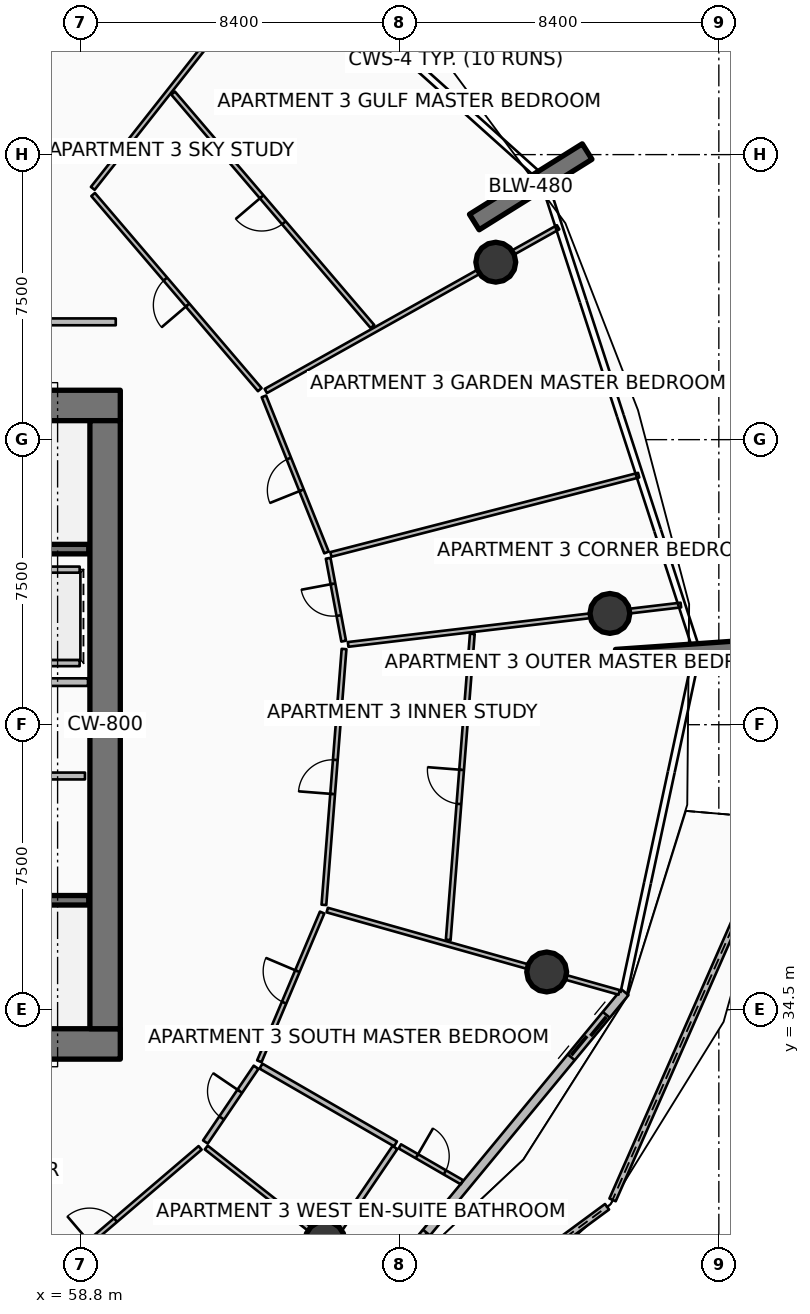
"""IFC4 building model, lengths in metres.
Left out: names, types, materials, properties, quantities, classifications, styles, units other than length and angle.
Written with IfcOpenShell. Run it as: python <this file> out.ifc"""

import sys

from ifc_helpers import new_model, si_unit, direction, frame, frame_2d, origin, origin_2d, place, context, subcontext, project, spatial, polyline, rectangle, circle, outline, extrude, element, fill, save


model = new_model("IFC4")
c1 = context("Model", 3, precision=1e-05, world=origin(), true_north=direction((0.0, 1.0)))
c2 = subcontext(c1, "Body", "Model", "MODEL_VIEW")
j1 = project(units=[si_unit("LENGTHUNIT", "METRE"), si_unit("PLANEANGLEUNIT", "RADIAN")], contexts=[c1])
p1 = place(None, origin())
s1 = spatial("IfcSite", under=j1, at=p1, CompositionType="ELEMENT")
p2 = place(p1, origin())
s2 = spatial("IfcBuilding", under=s1, at=p2, CompositionType="ELEMENT")
p3 = place(p2, frame((0.0, 0.0, 154.05)))
s3 = spatial("IfcBuildingStorey", under=s2, at=p3, CompositionType="ELEMENT", Elevation=154.05)
for number, where, z_axis, x_axis in (
    (1, (49.95, 33.6, 0.0), (0.0, 0.0, 1.0), (1.0, 0.0, 0.0)),
    (2, (49.95, 50.4, 0.0), (0.0, 0.0, 1.0), (1.0, 0.0, 0.0)),
):
    element("IfcWall", number, at=place(p3, frame(where, z_axis=z_axis, x_axis=x_axis)), inside=s3, PredefinedType="SHEAR", context=c2, shape_type="SweptSolid", body=[
        extrude(rectangle(XDim=9.9, YDim=0.8, at=frame_2d((4.95, 0.0))), origin(), (0.0, 0.0, 1.0), 3.75),
    ])
p4 = place(p3, frame((59.45, 34.0, 0.0), z_axis=(0.0, 0.0, 1.0), x_axis=(0.0, 1.0, 0.0)))
e3 = element("IfcWall", 3, at=p4, inside=s3, PredefinedType="SHEAR", context=c2, shape_type="SweptSolid", body=[
    extrude(rectangle(XDim=16.0, YDim=0.8, at=frame_2d((8.0, 0.0))), origin(), (0.0, 0.0, 1.0), 3.75),
])
for number, where, z_axis, x_axis in (
    (4, (69.165, 55.226, 0.0), (0.0, 0.0, 1.0), (0.848, 0.53, 0.0)),
    (5, (72.897, 43.741, 0.0), (0.0, 0.0, 1.0), (0.998, 0.07, 0.0)),
):
    element("IfcWall", number, at=place(p3, frame(where, z_axis=z_axis, x_axis=x_axis)), inside=s3, PredefinedType="SOLIDWALL", context=c2, shape_type="SweptSolid", body=[
        extrude(rectangle(XDim=3.5, YDim=0.48, at=frame_2d((1.75, 0.0))), origin(), (0.0, 0.0, 1.0), 3.75),
    ])
for number, where, z_axis, x_axis in (
    (6, (69.73, 54.169, 0.0), (0.0, 0.0, 1.0), (1.0, 0.0, 0.0)),
    (7, (65.234, 28.414, 0.0), (0.0, 0.0, 1.0), (1.0, 0.0, 0.0)),
    (8, (71.07, 35.494, 0.0), (0.0, 0.0, 1.0), (1.0, 0.0, 0.0)),
    (9, (72.733, 44.927, 0.0), (0.0, 0.0, 1.0), (1.0, 0.0, 0.0)),
):
    element("IfcColumn", number, at=place(p3, frame(where, z_axis=z_axis, x_axis=x_axis)), inside=s3, PredefinedType="COLUMN", context=c2, shape_type="SweptSolid", body=[
        extrude(circle(Radius=0.525, at=origin_2d()), origin(), (0.0, 0.0, 1.0), 3.5),
    ])
p5 = place(p3, frame((64.3, 23.15, 0.0), z_axis=(0.0, 0.0, 1.0), x_axis=(0.804716582715, 0.593659179584, 0.0)))
e10 = element("IfcWall", 10, at=p5, inside=s3, PredefinedType="PARAPET", context=c2, shape_type="SweptSolid", body=[
    extrude(outline(polyline([(0.0, 0.0), (10.386, 0.0), (10.386, 1.832), (5.193, 1.696), (0.0, 1.497), (0.0, 0.0)])), frame((0.0, 0.09, 0.0), z_axis=(0.0, -1.0, 0.0), x_axis=(1.0, 0.0, 0.0)), (0.0, 0.0, 1.0), 0.18),
])
p6 = place(p3, frame((72.803, 29.497, 0.0), z_axis=(0.0, 0.0, 1.0), x_axis=(0.402973896797, 0.915211472011, 0.0)))
e11 = element("IfcWall", 11, at=p6, inside=s3, PredefinedType="PARAPET", context=c2, shape_type="SweptSolid", body=[
    extrude(outline(polyline([(0.0, 0.0), (10.953, 0.0), (10.953, 1.756), (5.477, 1.853), (0.0, 1.832), (0.0, 0.0)])), frame((0.0, 0.09, 0.0), z_axis=(0.0, -1.0, 0.0), x_axis=(1.0, 0.0, 0.0)), (0.0, 0.0, 1.0), 0.18),
])
p7 = place(p3, frame((66.709, 27.187, 0.0), z_axis=(0.0, 0.0, 1.0), x_axis=(0.636771922292, 0.77105221547, 0.0)))
e12 = element("IfcWall", 12, at=p7, inside=s3, PredefinedType="SOLIDWALL", context=c2, shape_type="SweptSolid", body=[
    extrude(rectangle(XDim=10.082, YDim=0.24, at=frame_2d((5.041, 0.0))), origin(), (0.0, 0.0, 1.0), 2.45),
])
p8 = place(p7, frame((7.862, 0.0, 0.0)))
e13 = element("IfcOpeningElement", 13, at=p8, cuts=e12, PredefinedType="OPENING", context=c2, shape_type="SweptSolid", body=[
    extrude(rectangle(XDim=1.45, YDim=2.15, at=frame_2d((0.725, 1.075))), frame((0.0, 0.13, 0.0), z_axis=(0.0, -1.0, 0.0), x_axis=(1.0, 0.0, 0.0)), (0.0, 0.0, 1.0), 0.26),
])
p9 = place(p7, frame((0.28, 0.0, 0.65)))
e14 = element("IfcOpeningElement", 14, at=p9, cuts=e12, PredefinedType="OPENING", context=c2, shape_type="SweptSolid", body=[
    extrude(rectangle(XDim=1.6, YDim=1.5, at=frame_2d((0.8, 0.75))), frame((0.0, 0.13, 0.0), z_axis=(0.0, -1.0, 0.0), x_axis=(1.0, 0.0, 0.0)), (0.0, 0.0, 1.0), 0.26),
])
p10 = place(p3, frame((51.48, 46.62, 0.0), z_axis=(0.0, 0.0, 1.0), x_axis=(1.0, 0.0, 0.0)))
e15 = element("IfcWall", 15, at=p10, inside=s3, PredefinedType="SOLIDWALL", context=c2, shape_type="SweptSolid", body=[
    extrude(rectangle(XDim=7.54, YDim=0.25, at=frame_2d((3.77, 0.0))), origin(), (0.0, 0.0, 1.0), 3.5),
])
p11 = place(p10, frame((0.3, 0.0, 0.0)))
e16 = element("IfcOpeningElement", 16, at=p11, cuts=e15, PredefinedType="OPENING", context=c2, shape_type="SweptSolid", body=[
    extrude(rectangle(XDim=1.55, YDim=2.15, at=frame_2d((0.775, 1.075))), frame((0.0, 0.135, 0.0), z_axis=(0.0, -1.0, 0.0), x_axis=(1.0, 0.0, 0.0)), (0.0, 0.0, 1.0), 0.27),
])
p12 = place(p3, frame((51.48, 37.38, 0.0), z_axis=(0.0, 0.0, 1.0), x_axis=(1.0, 0.0, 0.0)))
e17 = element("IfcWall", 17, at=p12, inside=s3, PredefinedType="SOLIDWALL", context=c2, shape_type="SweptSolid", body=[
    extrude(rectangle(XDim=7.54, YDim=0.25, at=frame_2d((3.77, 0.0))), origin(), (0.0, 0.0, 1.0), 3.5),
])
p13 = place(p12, frame((0.3, 0.0, 0.0)))
e18 = element("IfcOpeningElement", 18, at=p13, cuts=e17, PredefinedType="OPENING", context=c2, shape_type="SweptSolid", body=[
    extrude(rectangle(XDim=1.55, YDim=2.15, at=frame_2d((0.775, 1.075))), frame((0.0, 0.135, 0.0), z_axis=(0.0, -1.0, 0.0), x_axis=(1.0, 0.0, 0.0)), (0.0, 0.0, 1.0), 0.27),
])
for number, where, z_axis, x_axis in (
    (19, (56.72, 46.08, 0.0), (0.0, 0.0, 1.0), (1.0, 0.0, 0.0)),
    (20, (56.72, 43.62, 0.0), (0.0, 0.0, 1.0), (1.0, 0.0, 0.0)),
):
    element("IfcWall", number, at=place(p3, frame(where, z_axis=z_axis, x_axis=x_axis)), inside=s3, PredefinedType="PARTITIONING", context=c2, shape_type="SweptSolid", body=[
        extrude(rectangle(XDim=2.06, YDim=0.16, at=frame_2d((1.03, 0.0))), origin(), (0.0, 0.0, 1.0), 3.5),
    ])
p14 = place(p3, frame((52.42, 40.65, 0.0), z_axis=(0.0, 0.0, 1.0), x_axis=(1.0, 0.0, 0.0)))
e21 = element("IfcWall", 21, at=p14, inside=s3, PredefinedType="PARTITIONING", context=c2, shape_type="SweptSolid", body=[
    extrude(rectangle(XDim=6.5, YDim=0.18, at=frame_2d((3.25, 0.0))), origin(), (0.0, 0.0, 1.0), 3.5),
])
p15 = place(p14, frame((2.825, 0.0, 0.0)))
e22 = element("IfcOpeningElement", 22, at=p15, cuts=e21, PredefinedType="OPENING", context=c2, shape_type="SweptSolid", body=[
    extrude(rectangle(XDim=0.85, YDim=2.06, at=frame_2d((0.425, 1.03))), frame((0.0, 0.1, 0.0), z_axis=(0.0, -1.0, 0.0), x_axis=(1.0, 0.0, 0.0)), (0.0, 0.0, 1.0), 0.2),
])
p16 = place(p3, frame((50.12, 43.12, 0.0), z_axis=(0.0, 0.0, 1.0), x_axis=(1.0, 0.0, 0.0)))
e23 = element("IfcWall", 23, at=p16, inside=s3, PredefinedType="PARTITIONING", context=c2, shape_type="SweptSolid", body=[
    extrude(rectangle(XDim=8.88, YDim=0.2, at=frame_2d((4.44, 0.0))), origin(), (0.0, 0.0, 1.0), 3.5),
])
p17 = place(p3, frame((56.815, 26.48, 0.0), z_axis=(0.0, 0.0, 1.0), x_axis=(0.760406411553, 0.649447526186, 0.0)))
e24 = element("IfcWall", 24, at=p17, inside=s3, PredefinedType="PARTITIONING", context=c2, shape_type="SweptSolid", body=[
    extrude(rectangle(XDim=6.753, YDim=0.125, at=frame_2d((3.376, 0.0))), origin(), (0.0, 0.0, 1.0), 2.94),
])
p18 = place(p17, frame((2.926, 0.0, 0.0)))
e25 = element("IfcOpeningElement", 25, at=p18, cuts=e24, PredefinedType="OPENING", context=c2, shape_type="SweptSolid", body=[
    extrude(rectangle(XDim=0.9, YDim=2.08, at=frame_2d((0.45, 1.04))), frame((0.0, 0.073, 0.0), z_axis=(0.0, -1.0, 0.0), x_axis=(1.0, 0.0, 0.0)), (0.0, 0.0, 1.0), 0.145),
])
p19 = place(p3, frame((62.112, 30.875, 0.0), z_axis=(0.0, 0.0, 1.0), x_axis=(0.785328664081, -0.619079065526, 0.0)))
e26 = element("IfcWall", 26, at=p19, inside=s3, PredefinedType="PARTITIONING", context=c2, shape_type="SweptSolid", body=[
    extrude(rectangle(XDim=5.87, YDim=0.125, at=frame_2d((2.935, 0.0))), origin(), (0.0, 0.0, 1.0), 2.94),
])
p20 = place(p3, frame((62.09, 31.02, 0.0), z_axis=(0.0, 0.0, 1.0), x_axis=(0.561179778306, 0.827693938857, 0.0)))
e27 = element("IfcWall", 27, at=p20, inside=s3, PredefinedType="PARTITIONING", context=c2, shape_type="SweptSolid", body=[
    extrude(rectangle(XDim=2.376, YDim=0.15, at=frame_2d((1.188, 0.0))), origin(), (0.0, 0.0, 1.0), 2.94),
])
p21 = place(p20, frame((0.763, 0.0, 0.0)))
e28 = element("IfcOpeningElement", 28, at=p21, cuts=e27, PredefinedType="OPENING", context=c2, shape_type="SweptSolid", body=[
    extrude(rectangle(XDim=0.85, YDim=2.06, at=frame_2d((0.425, 1.03))), frame((0.0, 0.085, 0.0), z_axis=(0.0, -1.0, 0.0), x_axis=(1.0, 0.0, 0.0)), (0.0, 0.0, 1.0), 0.17),
])
p22 = place(p3, frame((65.404, 28.407, 0.0), z_axis=(0.0, 0.0, 1.0), x_axis=(0.561106969612, 0.827743298767, 0.0)))
e29 = element("IfcWall", 29, at=p22, inside=s3, PredefinedType="PARTITIONING", context=c2, shape_type="SweptSolid", body=[
    extrude(rectangle(XDim=2.982, YDim=0.15, at=frame_2d((1.491, 0.0))), origin(), (0.0, 0.0, 1.0), 2.94),
])
p23 = place(p3, frame((63.552, 33.016, 0.0), z_axis=(0.0, 0.0, 1.0), x_axis=(0.865897249189, -0.500221904605, 0.0)))
e30 = element("IfcWall", 30, at=p23, inside=s3, PredefinedType="PARTITIONING", context=c2, shape_type="SweptSolid", body=[
    extrude(rectangle(XDim=4.09, YDim=0.15, at=frame_2d((2.045, 0.0))), origin(), (0.0, 0.0, 1.0), 2.94),
])
p24 = place(p3, frame((67.206, 30.905, 0.0), z_axis=(0.0, 0.0, 1.0), x_axis=(0.865877522555, -0.500256050372, 0.0)))
e31 = element("IfcWall", 31, at=p24, inside=s3, PredefinedType="PARTITIONING", context=c2, shape_type="SweptSolid", body=[
    extrude(rectangle(XDim=1.888, YDim=0.125, at=frame_2d((0.944, 0.0))), origin(), (0.0, 0.0, 1.0), 2.94),
])
p25 = place(p24, frame((0.519, 0.0, 0.0)))
e32 = element("IfcOpeningElement", 32, at=p25, cuts=e31, PredefinedType="OPENING", context=c2, shape_type="SweptSolid", body=[
    extrude(rectangle(XDim=0.85, YDim=2.06, at=frame_2d((0.425, 1.03))), frame((0.0, 0.073, 0.0), z_axis=(0.0, -1.0, 0.0), x_axis=(1.0, 0.0, 0.0)), (0.0, 0.0, 1.0), 0.145),
])
p26 = place(p3, frame((63.509, 33.144, 0.0), z_axis=(0.0, 0.0, 1.0), x_axis=(0.38881485578, 0.921315911034, 0.0)))
e33 = element("IfcWall", 33, at=p26, inside=s3, PredefinedType="PARTITIONING", context=c2, shape_type="SweptSolid", body=[
    extrude(rectangle(XDim=4.248, YDim=0.125, at=frame_2d((2.124, 0.0))), origin(), (0.0, 0.0, 1.0), 2.94),
])
p27 = place(p26, frame((1.674, 0.0, 0.0)))
e34 = element("IfcOpeningElement", 34, at=p27, cuts=e33, PredefinedType="OPENING", context=c2, shape_type="SweptSolid", body=[
    extrude(rectangle(XDim=0.9, YDim=2.08, at=frame_2d((0.45, 1.04))), frame((0.0, 0.073, 0.0), z_axis=(0.0, -1.0, 0.0), x_axis=(1.0, 0.0, 0.0)), (0.0, 0.0, 1.0), 0.145),
])
p28 = place(p3, frame((65.295, 37.122, 0.0), z_axis=(0.0, 0.0, 1.0), x_axis=(0.962453364466, -0.271447087346, 0.0)))
e35 = element("IfcWall", 35, at=p28, inside=s3, PredefinedType="PARTITIONING", context=c2, shape_type="SweptSolid", body=[
    extrude(rectangle(XDim=7.981, YDim=0.125, at=frame_2d((3.991, 0.0))), origin(), (0.0, 0.0, 1.0), 2.94),
])
p29 = place(p3, frame((65.208, 37.259, 0.0), z_axis=(0.0, 0.0, 1.0), x_axis=(0.078457580711, 0.996917452966, 0.0)))
e36 = element("IfcWall", 36, at=p29, inside=s3, PredefinedType="PARTITIONING", context=c2, shape_type="SweptSolid", body=[
    extrude(rectangle(XDim=6.752, YDim=0.125, at=frame_2d((3.376, 0.0))), origin(), (0.0, 0.0, 1.0), 2.94),
])
p30 = place(p29, frame((2.926, 0.0, 0.0)))
e37 = element("IfcOpeningElement", 37, at=p30, cuts=e36, PredefinedType="OPENING", context=c2, shape_type="SweptSolid", body=[
    extrude(rectangle(XDim=0.9, YDim=2.08, at=frame_2d((0.45, 1.04))), frame((0.0, 0.073, 0.0), z_axis=(0.0, -1.0, 0.0), x_axis=(1.0, 0.0, 0.0)), (0.0, 0.0, 1.0), 0.145),
])
p31 = place(p3, frame((68.479, 36.336, 0.0), z_axis=(0.0, 0.0, 1.0), x_axis=(0.078482765766, 0.996915470578, 0.0)))
e38 = element("IfcWall", 38, at=p31, inside=s3, PredefinedType="PARTITIONING", context=c2, shape_type="SweptSolid", body=[
    extrude(rectangle(XDim=8.079, YDim=0.125, at=frame_2d((4.039, 0.0))), origin(), (0.0, 0.0, 1.0), 2.94),
])
p32 = place(p31, frame((3.589, 0.0, 0.0)))
e39 = element("IfcOpeningElement", 39, at=p32, cuts=e38, PredefinedType="OPENING", context=c2, shape_type="SweptSolid", body=[
    extrude(rectangle(XDim=0.9, YDim=2.08, at=frame_2d((0.45, 1.04))), frame((0.0, 0.073, 0.0), z_axis=(0.0, -1.0, 0.0), x_axis=(1.0, 0.0, 0.0)), (0.0, 0.0, 1.0), 0.145),
])
p33 = place(p3, frame((65.845, 44.112, 0.0), z_axis=(0.0, 0.0, 1.0), x_axis=(0.993069843717, 0.117525680174, 0.0)))
e40 = element("IfcWall", 40, at=p33, inside=s3, PredefinedType="PARTITIONING", context=c2, shape_type="SweptSolid", body=[
    extrude(rectangle(XDim=8.816, YDim=0.125, at=frame_2d((4.408, 0.0))), origin(), (0.0, 0.0, 1.0), 2.94),
])
p34 = place(p3, frame((65.392, 46.48, 0.0), z_axis=(0.0, 0.0, 1.0), x_axis=(0.968391846752, 0.249433821172, 0.0)))
e41 = element("IfcWall", 41, at=p34, inside=s3, PredefinedType="PARTITIONING", context=c2, shape_type="SweptSolid", body=[
    extrude(rectangle(XDim=8.362, YDim=0.125, at=frame_2d((4.181, 0.0))), origin(), (0.0, 0.0, 1.0), 2.94),
])
p35 = place(p3, frame((65.728, 44.199, 0.0), z_axis=(0.0, 0.0, 1.0), x_axis=(-0.183909749888, 0.982943133602, 0.0)))
e42 = element("IfcWall", 42, at=p35, inside=s3, PredefinedType="PARTITIONING", context=c2, shape_type="SweptSolid", body=[
    extrude(rectangle(XDim=2.218, YDim=0.125, at=frame_2d((1.109, 0.0))), origin(), (0.0, 0.0, 1.0), 2.94),
])
p36 = place(p35, frame((0.684, 0.0, 0.0)))
e43 = element("IfcOpeningElement", 43, at=p36, cuts=e42, PredefinedType="OPENING", context=c2, shape_type="SweptSolid", body=[
    extrude(rectangle(XDim=0.85, YDim=2.06, at=frame_2d((0.425, 1.03))), frame((0.0, 0.073, 0.0), z_axis=(0.0, -1.0, 0.0), x_axis=(1.0, 0.0, 0.0)), (0.0, 0.0, 1.0), 0.145),
])
p37 = place(p3, frame((65.275, 46.532, 0.0), z_axis=(0.0, 0.0, 1.0), x_axis=(-0.372161107737, 0.928168147421, 0.0)))
e44 = element("IfcWall", 44, at=p37, inside=s3, PredefinedType="PARTITIONING", context=c2, shape_type="SweptSolid", body=[
    extrude(rectangle(XDim=4.425, YDim=0.125, at=frame_2d((2.212, 0.0))), origin(), (0.0, 0.0, 1.0), 2.94),
])
p38 = place(p37, frame((1.762, 0.0, 0.0)))
e45 = element("IfcOpeningElement", 45, at=p38, cuts=e44, PredefinedType="OPENING", context=c2, shape_type="SweptSolid", body=[
    extrude(rectangle(XDim=0.9, YDim=2.08, at=frame_2d((0.45, 1.04))), frame((0.0, 0.073, 0.0), z_axis=(0.0, -1.0, 0.0), x_axis=(1.0, 0.0, 0.0)), (0.0, 0.0, 1.0), 0.145),
])
p39 = place(p3, frame((59.73, 52.6, 0.0), z_axis=(0.0, 0.0, 1.0), x_axis=(-1.0, 0.0, 0.0)))
e46 = element("IfcWall", 46, at=p39, inside=s3, PredefinedType="PARTITIONING", context=c2, shape_type="SweptSolid", body=[
    extrude(rectangle(XDim=3.254, YDim=0.18, at=frame_2d((1.627, 0.0))), origin(), (0.0, 0.0, 1.0), 2.94),
])
p40 = place(p3, frame((63.679, 50.781, 0.0), z_axis=(0.0, 0.0, 1.0), x_axis=(0.872493265844, 0.488626136281, 0.0)))
e47 = element("IfcWall", 47, at=p40, inside=s3, PredefinedType="PARTITIONING", context=c2, shape_type="SweptSolid", body=[
    extrude(rectangle(XDim=8.816, YDim=0.125, at=frame_2d((4.408, 0.0))), origin(), (0.0, 0.0, 1.0), 2.94),
])
p41 = place(p3, frame((59.125, 56.112, 0.0), z_axis=(0.0, 0.0, 1.0), x_axis=(0.61910151414, 0.78531096719, 0.0)))
e48 = element("IfcWall", 48, at=p41, inside=s3, PredefinedType="PARTITIONING", context=c2, shape_type="SweptSolid", body=[
    extrude(rectangle(XDim=8.082, YDim=0.125, at=frame_2d((4.041, 0.0))), origin(), (0.0, 0.0, 1.0), 2.94),
])
p42 = place(p3, frame((63.52, 50.815, 0.0), z_axis=(0.0, 0.0, 1.0), x_axis=(-0.649447526186, 0.760406411553, 0.0)))
e49 = element("IfcWall", 49, at=p42, inside=s3, PredefinedType="PARTITIONING", context=c2, shape_type="SweptSolid", body=[
    extrude(rectangle(XDim=6.753, YDim=0.125, at=frame_2d((3.376, 0.0))), origin(), (0.0, 0.0, 1.0), 2.94),
])
p43 = place(p42, frame((2.926, 0.0, 0.0)))
e50 = element("IfcOpeningElement", 50, at=p43, cuts=e49, PredefinedType="OPENING", context=c2, shape_type="SweptSolid", body=[
    extrude(rectangle(XDim=0.9, YDim=2.08, at=frame_2d((0.45, 1.04))), frame((0.0, 0.073, 0.0), z_axis=(0.0, -1.0, 0.0), x_axis=(1.0, 0.0, 0.0)), (0.0, 0.0, 1.0), 0.145),
])
p44 = place(p3, frame((66.486, 52.476, 0.0), z_axis=(0.0, 0.0, 1.0), x_axis=(-0.649426515446, 0.760424355894, 0.0)))
e51 = element("IfcWall", 51, at=p44, inside=s3, PredefinedType="PARTITIONING", context=c2, shape_type="SweptSolid", body=[
    extrude(rectangle(XDim=8.079, YDim=0.125, at=frame_2d((4.04, 0.0))), origin(), (0.0, 0.0, 1.0), 2.94),
])
p45 = place(p44, frame((3.589, 0.0, 0.0)))
e52 = element("IfcOpeningElement", 52, at=p45, cuts=e51, PredefinedType="OPENING", context=c2, shape_type="SweptSolid", body=[
    extrude(rectangle(XDim=0.9, YDim=2.08, at=frame_2d((0.45, 1.04))), frame((0.0, 0.073, 0.0), z_axis=(0.0, -1.0, 0.0), x_axis=(1.0, 0.0, 0.0)), (0.0, 0.0, 1.0), 0.145),
])
p46 = place(p8, origin())
e53 = element("IfcDoor", 53, at=p46, inside=s3, OperationType="DOUBLE_DOOR_SLIDING", PredefinedType="DOOR", context=c2, shape_type="SweptSolid", body=[
    extrude(rectangle(XDim=1.45, YDim=2.15, at=frame_2d((0.725, 1.075))), frame((0.0, 0.025, 0.0), z_axis=(0.0, -1.0, 0.0), x_axis=(1.0, 0.0, 0.0)), (0.0, 0.0, 1.0), 0.05),
])
fill(e13, e53)
p47 = place(p9, origin())
e54 = element("IfcWindow", 54, at=p47, inside=s3, PartitioningType="SINGLE_PANEL", PredefinedType="WINDOW", context=c2, shape_type="SweptSolid", body=[
    extrude(rectangle(XDim=1.6, YDim=1.5, at=frame_2d((0.8, 0.75))), frame((0.0, 0.03, 0.0), z_axis=(0.0, -1.0, 0.0), x_axis=(1.0, 0.0, 0.0)), (0.0, 0.0, 1.0), 0.06),
])
fill(e14, e54)
p48 = place(p18, origin())
e55 = element("IfcDoor", 55, at=p48, inside=s3, OperationType="SINGLE_SWING_LEFT", PredefinedType="DOOR", context=c2, shape_type="SweptSolid", body=[
    extrude(rectangle(XDim=0.9, YDim=2.08, at=frame_2d((0.45, 1.04))), frame((0.0, 0.025, 0.0), z_axis=(0.0, -1.0, 0.0), x_axis=(1.0, 0.0, 0.0)), (0.0, 0.0, 1.0), 0.05),
])
fill(e25, e55)
p49 = place(p21, origin())
e56 = element("IfcDoor", 56, at=p49, inside=s3, OperationType="SINGLE_SWING_RIGHT", PredefinedType="DOOR", context=c2, shape_type="SweptSolid", body=[
    extrude(rectangle(XDim=0.85, YDim=2.06, at=frame_2d((0.425, 1.03))), frame((0.0, 0.025, 0.0), z_axis=(0.0, -1.0, 0.0), x_axis=(1.0, 0.0, 0.0)), (0.0, 0.0, 1.0), 0.05),
])
fill(e28, e56)
p50 = place(p25, origin())
e57 = element("IfcDoor", 57, at=p50, inside=s3, OperationType="SINGLE_SWING_LEFT", PredefinedType="DOOR", context=c2, shape_type="SweptSolid", body=[
    extrude(rectangle(XDim=0.85, YDim=2.06, at=frame_2d((0.425, 1.03))), frame((0.0, 0.025, 0.0), z_axis=(0.0, -1.0, 0.0), x_axis=(1.0, 0.0, 0.0)), (0.0, 0.0, 1.0), 0.05),
])
fill(e32, e57)
p51 = place(p27, origin())
e58 = element("IfcDoor", 58, at=p51, inside=s3, OperationType="SINGLE_SWING_RIGHT", PredefinedType="DOOR", context=c2, shape_type="SweptSolid", body=[
    extrude(rectangle(XDim=0.9, YDim=2.08, at=frame_2d((0.45, 1.04))), frame((0.0, 0.025, 0.0), z_axis=(0.0, -1.0, 0.0), x_axis=(1.0, 0.0, 0.0)), (0.0, 0.0, 1.0), 0.05),
])
fill(e34, e58)
p52 = place(p30, origin())
e59 = element("IfcDoor", 59, at=p52, inside=s3, OperationType="SINGLE_SWING_LEFT", PredefinedType="DOOR", context=c2, shape_type="SweptSolid", body=[
    extrude(rectangle(XDim=0.9, YDim=2.08, at=frame_2d((0.45, 1.04))), frame((0.0, 0.025, 0.0), z_axis=(0.0, -1.0, 0.0), x_axis=(1.0, 0.0, 0.0)), (0.0, 0.0, 1.0), 0.05),
])
fill(e37, e59)
p53 = place(p32, origin())
e60 = element("IfcDoor", 60, at=p53, inside=s3, OperationType="SINGLE_SWING_RIGHT", PredefinedType="DOOR", context=c2, shape_type="SweptSolid", body=[
    extrude(rectangle(XDim=0.9, YDim=2.08, at=frame_2d((0.45, 1.04))), frame((0.0, 0.025, 0.0), z_axis=(0.0, -1.0, 0.0), x_axis=(1.0, 0.0, 0.0)), (0.0, 0.0, 1.0), 0.05),
])
fill(e39, e60)
p54 = place(p36, origin())
e61 = element("IfcDoor", 61, at=p54, inside=s3, OperationType="SINGLE_SWING_RIGHT", PredefinedType="DOOR", context=c2, shape_type="SweptSolid", body=[
    extrude(rectangle(XDim=0.85, YDim=2.06, at=frame_2d((0.425, 1.03))), frame((0.0, 0.025, 0.0), z_axis=(0.0, -1.0, 0.0), x_axis=(1.0, 0.0, 0.0)), (0.0, 0.0, 1.0), 0.05),
])
fill(e43, e61)
p55 = place(p38, origin())
e62 = element("IfcDoor", 62, at=p55, inside=s3, OperationType="SINGLE_SWING_LEFT", PredefinedType="DOOR", context=c2, shape_type="SweptSolid", body=[
    extrude(rectangle(XDim=0.9, YDim=2.08, at=frame_2d((0.45, 1.04))), frame((0.0, 0.025, 0.0), z_axis=(0.0, -1.0, 0.0), x_axis=(1.0, 0.0, 0.0)), (0.0, 0.0, 1.0), 0.05),
])
fill(e45, e62)
p56 = place(p43, origin())
e63 = element("IfcDoor", 63, at=p56, inside=s3, OperationType="SINGLE_SWING_LEFT", PredefinedType="DOOR", context=c2, shape_type="SweptSolid", body=[
    extrude(rectangle(XDim=0.9, YDim=2.08, at=frame_2d((0.45, 1.04))), frame((0.0, 0.025, 0.0), z_axis=(0.0, -1.0, 0.0), x_axis=(1.0, 0.0, 0.0)), (0.0, 0.0, 1.0), 0.05),
])
fill(e50, e63)
p57 = place(p45, origin())
e64 = element("IfcDoor", 64, at=p57, inside=s3, OperationType="SINGLE_SWING_RIGHT", PredefinedType="DOOR", context=c2, shape_type="SweptSolid", body=[
    extrude(rectangle(XDim=0.9, YDim=2.08, at=frame_2d((0.45, 1.04))), frame((0.0, 0.025, 0.0), z_axis=(0.0, -1.0, 0.0), x_axis=(1.0, 0.0, 0.0)), (0.0, 0.0, 1.0), 0.05),
])
fill(e52, e64)
save(model, sys.argv[1])
